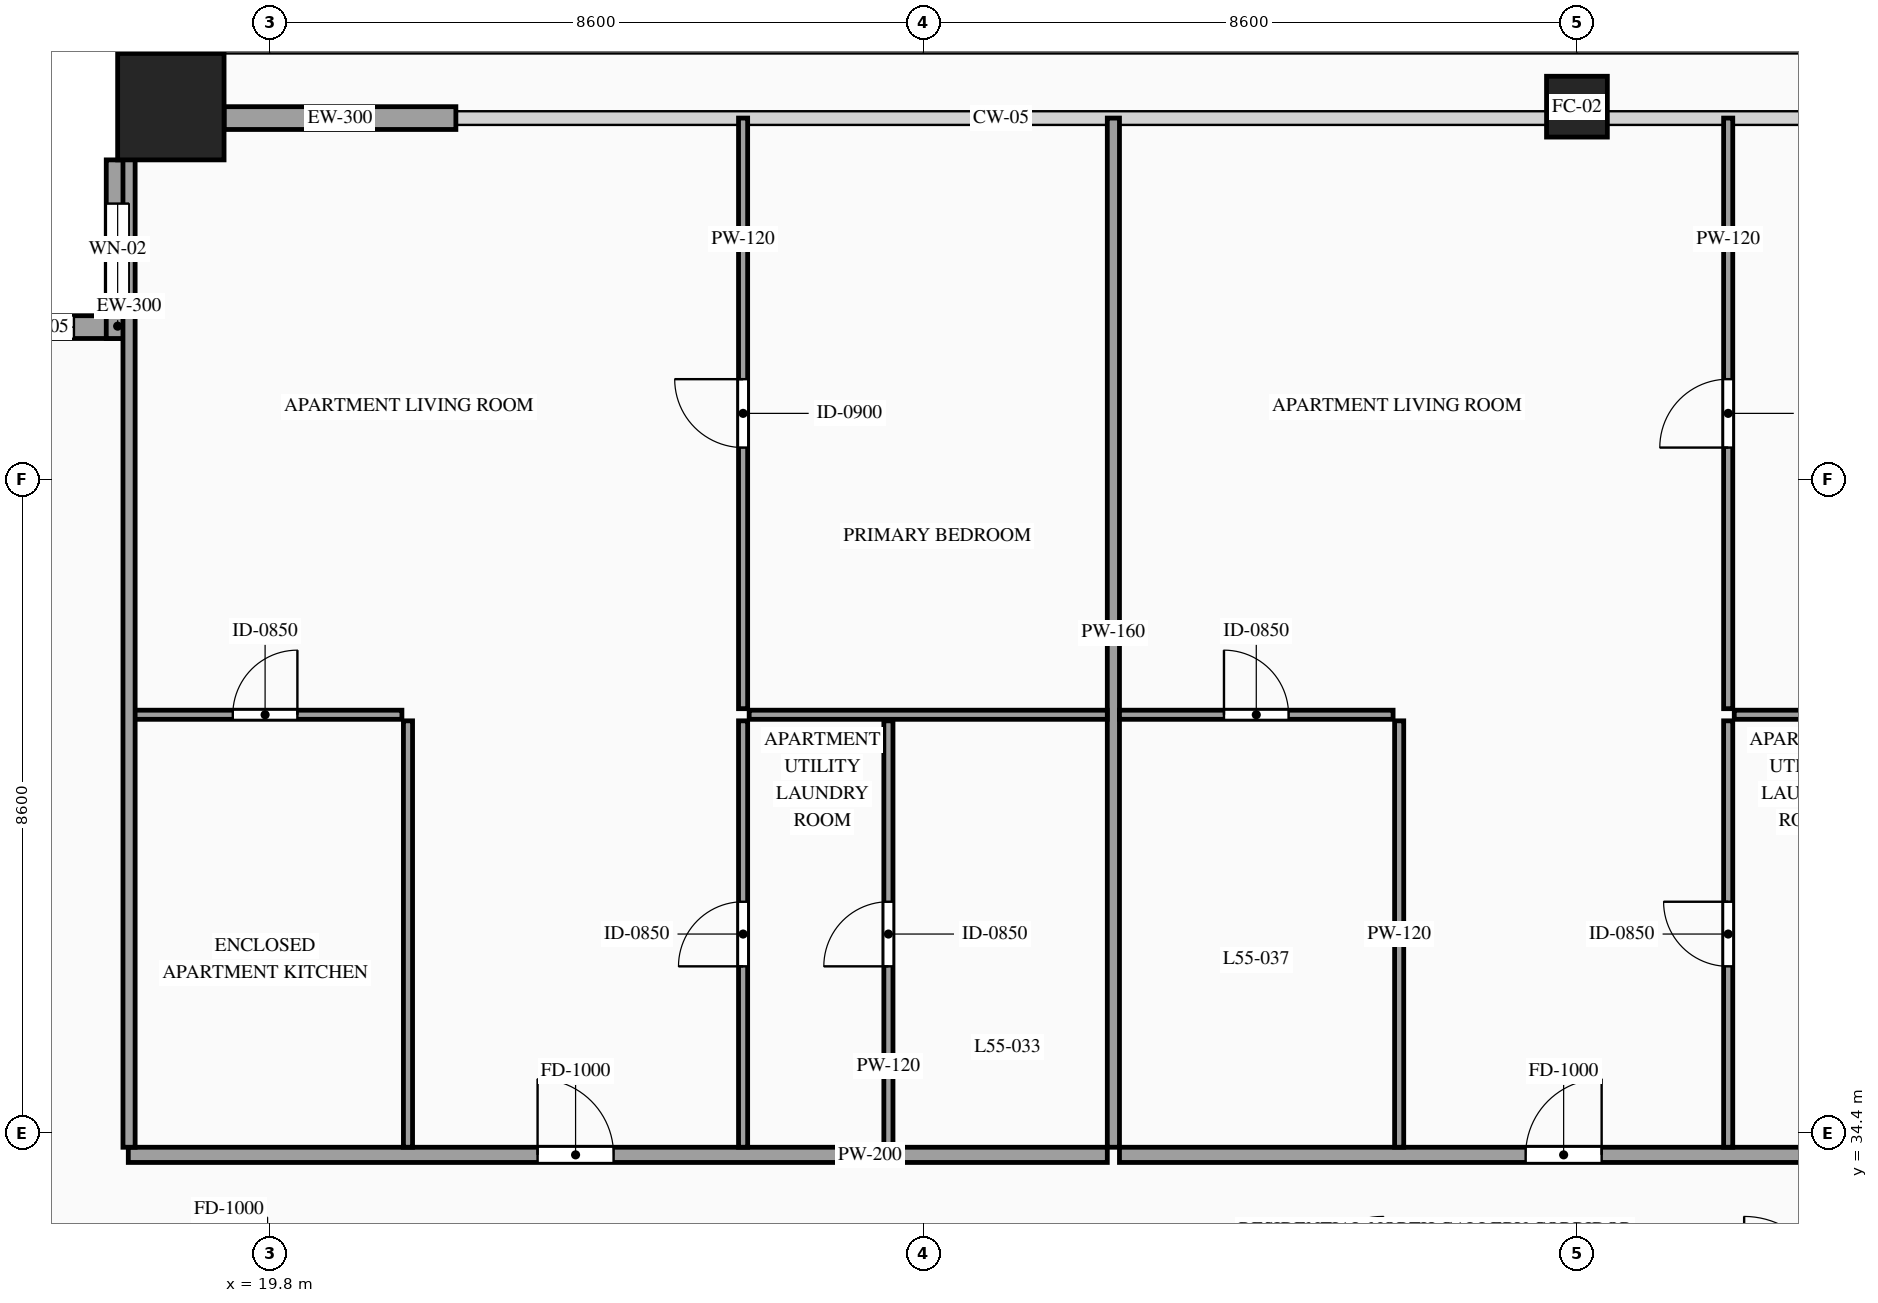
"""IFC4 building model, lengths in metres.
Left out: names, types, materials, properties, quantities, classifications, styles, units other than length and angle.
Written with IfcOpenShell. Run it as: python <this file> out.ifc"""

import sys

from ifc_helpers import new_model, si_unit, direction, frame, frame_2d, origin, origin_2d, place, context, subcontext, project, spatial, rectangle, hollow_rectangle, extrude, source, transform, mapped, element, fill, save


model = new_model("IFC4")
c1 = context("Model", 3, precision=1e-05, world=origin(), true_north=direction((0.0, 1.0)))
c2 = subcontext(c1, "Body", "Model", "MODEL_VIEW")
j1 = project(units=[si_unit("LENGTHUNIT", "METRE"), si_unit("PLANEANGLEUNIT", "RADIAN")], contexts=[c1])
p1 = place(None, origin())
s1 = spatial("IfcSite", under=j1, at=p1, CompositionType="ELEMENT")
p2 = place(p1, origin())
s2 = spatial("IfcBuilding", under=s1, at=p2, CompositionType="ELEMENT")
p3 = place(p2, frame((0.0, 0.0, 209.0)))
s3 = spatial("IfcBuildingStorey", under=s2, at=p3, CompositionType="ELEMENT", Elevation=209.0)
m1 = source(origin(), c2, "Body", "SweptSolid", [
    extrude(hollow_rectangle(XDim=1.4, YDim=1.4, WallThickness=0.06, at=origin_2d()), origin(), (0.0, 0.0, 1.0), 3.5),
])
p4 = place(p3, frame((18.5, 47.9, 0.0), z_axis=(0.0, 0.0, 1.0), x_axis=(1.0, 0.0, 0.0)))
e1 = element("IfcColumn", 1, at=p4, inside=s3, PredefinedType="COLUMN", context=c2, shape_type="MappedRepresentation", body=[
    mapped(m1, transform((0.0, 0.0, 0.0), scale=1.0)),
])
m2 = source(origin(), c2, "Body", "SweptSolid", [
    extrude(hollow_rectangle(XDim=0.8, YDim=0.8, WallThickness=0.036, at=origin_2d()), origin(), (0.0, 0.0, 1.0), 3.5),
])
p5 = place(p3, frame((37.0, 47.9, 0.0), z_axis=(0.0, 0.0, 1.0), x_axis=(1.0, 0.0, 0.0)))
e2 = element("IfcColumn", 2, at=p5, inside=s3, PredefinedType="COLUMN", context=c2, shape_type="MappedRepresentation", body=[
    mapped(m2, transform((0.0, 0.0, 0.0), scale=1.0)),
])
p6 = place(p3, frame((17.95, 45.0, 0.0), z_axis=(0.0, 0.0, 1.0), x_axis=(-1.0, 0.0, 0.0)))
e3 = element("IfcWall", 3, at=p6, inside=s3, PredefinedType="SOLIDWALL", context=c2, shape_type="SweptSolid", body=[
    extrude(rectangle(XDim=2.35, YDim=0.3, at=frame_2d((1.175, 0.0))), origin(), (0.0, 0.0, 1.0), 3.28),
])
p7 = place(p6, frame((0.725, 0.0, 0.85)))
e4 = element("IfcOpeningElement", 4, at=p7, cuts=e3, PredefinedType="OPENING", context=c2, shape_type="SweptSolid", body=[
    extrude(rectangle(XDim=0.9, YDim=1.5, at=frame_2d((0.45, 0.75))), frame((0.0, 0.165, 0.0), z_axis=(0.0, -1.0, 0.0), x_axis=(1.0, 0.0, 0.0)), (0.0, 0.0, 1.0), 0.33),
])
p8 = place(p3, frame((17.8, 47.2, 0.0), z_axis=(0.0, 0.0, 1.0), x_axis=(0.0, -1.0, 0.0)))
e5 = element("IfcWall", 5, at=p8, inside=s3, PredefinedType="SOLIDWALL", context=c2, shape_type="SweptSolid", body=[
    extrude(rectangle(XDim=2.35, YDim=0.3, at=frame_2d((1.175, 0.0))), origin(), (0.0, 0.0, 1.0), 3.28),
])
p9 = place(p8, frame((0.575, 0.0, 0.85)))
e6 = element("IfcOpeningElement", 6, at=p9, cuts=e5, PredefinedType="OPENING", context=c2, shape_type="SweptSolid", body=[
    extrude(rectangle(XDim=1.2, YDim=2.1, at=frame_2d((0.6, 1.05))), frame((0.0, 0.165, 0.0), z_axis=(0.0, -1.0, 0.0), x_axis=(1.0, 0.0, 0.0)), (0.0, 0.0, 1.0), 0.33),
])
m3 = source(origin(), c2, "Body", "SweptSolid", [
    extrude(rectangle(XDim=3.05, YDim=0.3, at=frame_2d((1.525, 0.0))), origin(), (0.0, 0.0, 1.0), 2.835),
])
p10 = place(p3, frame((19.2, 47.75, 0.0), z_axis=(0.0, 0.0, 1.0), x_axis=(1.0, 0.0, 0.0)))
e7 = element("IfcWall", 7, at=p10, inside=s3, PredefinedType="SOLIDWALL", context=c2, shape_type="MappedRepresentation", body=[
    mapped(m3, transform((0.0, 0.0, 0.0), scale=1.0)),
])
p11 = place(p3, frame((17.94, 34.11, 0.0), z_axis=(0.0, 0.0, 1.0), x_axis=(1.0, 0.0, 0.0)))
e8 = element("IfcWall", 8, at=p11, inside=s3, PredefinedType="PARTITIONING", context=c2, shape_type="SweptSolid", body=[
    extrude(rectangle(XDim=12.881, YDim=0.2, at=frame_2d((6.44, 0.0))), origin(), (0.0, 0.0, 1.0), 3.28),
])
p12 = place(p11, frame((5.385, 0.0, 0.0)))
e9 = element("IfcOpeningElement", 9, at=p12, cuts=e8, PredefinedType="OPENING", context=c2, shape_type="SweptSolid", body=[
    extrude(rectangle(XDim=1.0, YDim=2.2, at=frame_2d((0.5, 1.1))), frame((0.0, 0.115, 0.0), z_axis=(0.0, -1.0, 0.0), x_axis=(1.0, 0.0, 0.0)), (0.0, 0.0, 1.0), 0.23),
])
m4 = source(origin(), c2, "Body", "SweptSolid", [
    extrude(rectangle(XDim=13.54, YDim=0.16, at=frame_2d((6.77, 0.0))), origin(), (0.0, 0.0, 1.0), 3.28),
])
p13 = place(p3, frame((30.901, 34.21, 0.0), z_axis=(0.0, 0.0, 1.0), x_axis=(0.0, 1.0, 0.0)))
e10 = element("IfcWall", 10, at=p13, inside=s3, PredefinedType="PARTITIONING", context=c2, shape_type="MappedRepresentation", body=[
    mapped(m4, transform((0.0, 0.0, 0.0), scale=1.0)),
])
p14 = place(p3, frame((17.94, 39.9, 0.0), z_axis=(0.0, 0.0, 1.0), x_axis=(1.0, 0.0, 0.0)))
e11 = element("IfcWall", 11, at=p14, inside=s3, PredefinedType="PARTITIONING", context=c2, shape_type="SweptSolid", body=[
    extrude(rectangle(XDim=3.6, YDim=0.12, at=frame_2d((1.8, 0.0))), origin(), (0.0, 0.0, 1.0), 3.28),
])
p15 = place(p14, frame((1.375, 0.0, 0.0)))
e12 = element("IfcOpeningElement", 12, at=p15, cuts=e11, PredefinedType="OPENING", context=c2, shape_type="SweptSolid", body=[
    extrude(rectangle(XDim=0.85, YDim=2.1, at=frame_2d((0.425, 1.05))), frame((0.0, 0.075, 0.0), z_axis=(0.0, -1.0, 0.0), x_axis=(1.0, 0.0, 0.0)), (0.0, 0.0, 1.0), 0.15),
])
m5 = source(origin(), c2, "Body", "SweptSolid", [
    extrude(rectangle(XDim=5.61, YDim=0.12, at=frame_2d((2.805, 0.0))), origin(), (0.0, 0.0, 1.0), 3.28),
])
p16 = place(p3, frame((21.62, 34.21, 0.0), z_axis=(0.0, 0.0, 1.0), x_axis=(0.0, 1.0, 0.0)))
e13 = element("IfcWall", 13, at=p16, inside=s3, PredefinedType="PARTITIONING", context=c2, shape_type="MappedRepresentation", body=[
    mapped(m5, transform((0.0, 0.0, 0.0), scale=1.0)),
])
p17 = place(p3, frame((27.941, 34.21, 0.0), z_axis=(0.0, 0.0, 1.0), x_axis=(0.0, 1.0, 0.0)))
e14 = element("IfcWall", 14, at=p17, inside=s3, PredefinedType="PARTITIONING", context=c2, shape_type="SweptSolid", body=[
    extrude(rectangle(XDim=5.61, YDim=0.12, at=frame_2d((2.805, 0.0))), origin(), (0.0, 0.0, 1.0), 3.28),
])
p18 = place(p17, frame((2.38, 0.0, 0.0)))
e15 = element("IfcOpeningElement", 15, at=p18, cuts=e14, PredefinedType="OPENING", context=c2, shape_type="SweptSolid", body=[
    extrude(rectangle(XDim=0.85, YDim=2.1, at=frame_2d((0.425, 1.05))), frame((0.0, 0.075, 0.0), z_axis=(0.0, -1.0, 0.0), x_axis=(1.0, 0.0, 0.0)), (0.0, 0.0, 1.0), 0.15),
])
m6 = source(origin(), c2, "Body", "SweptSolid", [
    extrude(rectangle(XDim=4.712, YDim=0.12, at=frame_2d((2.356, 0.0))), origin(), (0.0, 0.0, 1.0), 2.875),
])
p19 = place(p3, frame((26.109, 39.9, 0.0), z_axis=(0.0, 0.0, 1.0), x_axis=(1.0, 0.0, 0.0)))
e16 = element("IfcWall", 16, at=p19, inside=s3, PredefinedType="PARTITIONING", context=c2, shape_type="MappedRepresentation", body=[
    mapped(m6, transform((0.0, 0.0, 0.0), scale=1.0)),
])
p20 = place(p3, frame((26.029, 39.98, 0.0), z_axis=(0.0, 0.0, 1.0), x_axis=(0.0, 1.0, 0.0)))
e17 = element("IfcWall", 17, at=p20, inside=s3, PredefinedType="PARTITIONING", context=c2, shape_type="SweptSolid", body=[
    extrude(rectangle(XDim=7.77, YDim=0.12, at=frame_2d((3.885, 0.0))), origin(), (0.0, 0.0, 1.0), 3.28),
])
p21 = place(p20, frame((3.435, 0.0, 0.0)))
e18 = element("IfcOpeningElement", 18, at=p21, cuts=e17, PredefinedType="OPENING", context=c2, shape_type="SweptSolid", body=[
    extrude(rectangle(XDim=0.9, YDim=2.15, at=frame_2d((0.45, 1.075))), frame((0.0, 0.075, 0.0), z_axis=(0.0, -1.0, 0.0), x_axis=(1.0, 0.0, 0.0)), (0.0, 0.0, 1.0), 0.15),
])
p22 = place(p3, frame((26.029, 34.21, 0.0), z_axis=(0.0, 0.0, 1.0), x_axis=(0.0, 1.0, 0.0)))
e19 = element("IfcWall", 19, at=p22, inside=s3, PredefinedType="PARTITIONING", context=c2, shape_type="SweptSolid", body=[
    extrude(rectangle(XDim=5.61, YDim=0.12, at=frame_2d((2.805, 0.0))), origin(), (0.0, 0.0, 1.0), 3.28),
])
p23 = place(p22, frame((2.38, 0.0, 0.0)))
e20 = element("IfcOpeningElement", 20, at=p23, cuts=e19, PredefinedType="OPENING", context=c2, shape_type="SweptSolid", body=[
    extrude(rectangle(XDim=0.85, YDim=2.1, at=frame_2d((0.425, 1.05))), frame((0.0, 0.075, 0.0), z_axis=(0.0, -1.0, 0.0), x_axis=(1.0, 0.0, 0.0)), (0.0, 0.0, 1.0), 0.15),
])
p24 = place(p3, frame((30.981, 34.11, 0.0), z_axis=(0.0, 0.0, 1.0), x_axis=(1.0, 0.0, 0.0)))
e21 = element("IfcWall", 21, at=p24, inside=s3, PredefinedType="PARTITIONING", context=c2, shape_type="SweptSolid", body=[
    extrude(rectangle(XDim=12.801, YDim=0.2, at=frame_2d((6.4, 0.0))), origin(), (0.0, 0.0, 1.0), 3.28),
])
p25 = place(p24, frame((5.344, 0.0, 0.0)))
e22 = element("IfcOpeningElement", 22, at=p25, cuts=e21, PredefinedType="OPENING", context=c2, shape_type="SweptSolid", body=[
    extrude(rectangle(XDim=1.0, YDim=2.2, at=frame_2d((0.5, 1.1))), frame((0.0, 0.115, 0.0), z_axis=(0.0, -1.0, 0.0), x_axis=(1.0, 0.0, 0.0)), (0.0, 0.0, 1.0), 0.23),
])
p26 = place(p3, frame((30.981, 39.9, 0.0), z_axis=(0.0, 0.0, 1.0), x_axis=(1.0, 0.0, 0.0)))
e23 = element("IfcWall", 23, at=p26, inside=s3, PredefinedType="PARTITIONING", context=c2, shape_type="SweptSolid", body=[
    extrude(rectangle(XDim=3.6, YDim=0.12, at=frame_2d((1.8, 0.0))), origin(), (0.0, 0.0, 1.0), 2.875),
])
p27 = place(p26, frame((1.375, 0.0, 0.0)))
e24 = element("IfcOpeningElement", 24, at=p27, cuts=e23, PredefinedType="OPENING", context=c2, shape_type="SweptSolid", body=[
    extrude(rectangle(XDim=0.85, YDim=2.1, at=frame_2d((0.425, 1.05))), frame((0.0, 0.075, 0.0), z_axis=(0.0, -1.0, 0.0), x_axis=(1.0, 0.0, 0.0)), (0.0, 0.0, 1.0), 0.15),
])
p28 = place(p3, frame((34.661, 34.21, 0.0), z_axis=(0.0, 0.0, 1.0), x_axis=(0.0, 1.0, 0.0)))
e25 = element("IfcWall", 25, at=p28, inside=s3, PredefinedType="PARTITIONING", context=c2, shape_type="MappedRepresentation", body=[
    mapped(m5, transform((0.0, 0.0, 0.0), scale=1.0)),
])
m7 = source(origin(), c2, "Body", "SweptSolid", [
    extrude(rectangle(XDim=4.712, YDim=0.12, at=frame_2d((2.356, 0.0))), origin(), (0.0, 0.0, 1.0), 2.875),
])
p29 = place(p3, frame((39.07, 39.9, 0.0), z_axis=(0.0, 0.0, 1.0), x_axis=(1.0, 0.0, 0.0)))
e26 = element("IfcWall", 26, at=p29, inside=s3, PredefinedType="PARTITIONING", context=c2, shape_type="MappedRepresentation", body=[
    mapped(m7, transform((0.0, 0.0, 0.0), scale=1.0)),
])
p30 = place(p3, frame((38.99, 39.98, 0.0), z_axis=(0.0, 0.0, 1.0), x_axis=(0.0, 1.0, 0.0)))
e27 = element("IfcWall", 27, at=p30, inside=s3, PredefinedType="PARTITIONING", context=c2, shape_type="SweptSolid", body=[
    extrude(rectangle(XDim=7.77, YDim=0.12, at=frame_2d((3.885, 0.0))), origin(), (0.0, 0.0, 1.0), 3.28),
])
p31 = place(p30, frame((3.435, 0.0, 0.0)))
e28 = element("IfcOpeningElement", 28, at=p31, cuts=e27, PredefinedType="OPENING", context=c2, shape_type="SweptSolid", body=[
    extrude(rectangle(XDim=0.9, YDim=2.15, at=frame_2d((0.45, 1.075))), frame((0.0, 0.075, 0.0), z_axis=(0.0, -1.0, 0.0), x_axis=(1.0, 0.0, 0.0)), (0.0, 0.0, 1.0), 0.15),
])
p32 = place(p3, frame((38.99, 34.21, 0.0), z_axis=(0.0, 0.0, 1.0), x_axis=(0.0, 1.0, 0.0)))
e29 = element("IfcWall", 29, at=p32, inside=s3, PredefinedType="PARTITIONING", context=c2, shape_type="SweptSolid", body=[
    extrude(rectangle(XDim=5.61, YDim=0.12, at=frame_2d((2.805, 0.0))), origin(), (0.0, 0.0, 1.0), 3.28),
])
p33 = place(p32, frame((2.38, 0.0, 0.0)))
e30 = element("IfcOpeningElement", 30, at=p33, cuts=e29, PredefinedType="OPENING", context=c2, shape_type="SweptSolid", body=[
    extrude(rectangle(XDim=0.85, YDim=2.1, at=frame_2d((0.425, 1.05))), frame((0.0, 0.075, 0.0), z_axis=(0.0, -1.0, 0.0), x_axis=(1.0, 0.0, 0.0)), (0.0, 0.0, 1.0), 0.15),
])
m8 = source(origin(), c2, "Body", "SweptSolid", [
    extrude(rectangle(XDim=13.39, YDim=0.16, at=frame_2d((6.695, 0.0))), origin(), (0.0, 0.0, 1.0), 3.28),
])
p34 = place(p3, frame((17.95, 34.21, 0.0), z_axis=(0.0, 0.0, 1.0), x_axis=(0.0, 1.0, 0.0)))
e31 = element("IfcWall", 31, at=p34, inside=s3, PredefinedType="PARTITIONING", context=c2, shape_type="MappedRepresentation", body=[
    mapped(m8, transform((0.0, 0.0, 0.0), scale=1.0)),
])
m9 = source(origin(), c2, "Body", "SweptSolid", [
    extrude(rectangle(XDim=0.9, YDim=1.5, at=frame_2d((0.45, 0.75))), frame((0.0, 0.03, 0.0), z_axis=(0.0, -1.0, 0.0), x_axis=(1.0, 0.0, 0.0)), (0.0, 0.0, 1.0), 0.06),
])
p35 = place(p7, origin())
e32 = element("IfcWindow", 32, at=p35, inside=s3, PartitioningType="SINGLE_PANEL", PredefinedType="WINDOW", context=c2, shape_type="MappedRepresentation", body=[
    mapped(m9, transform((0.0, 0.0, 0.0), scale=1.0)),
])
fill(e4, e32)
m10 = source(origin(), c2, "Body", "SweptSolid", [
    extrude(rectangle(XDim=1.2, YDim=2.1, at=frame_2d((0.6, 1.05))), frame((0.0, 0.03, 0.0), z_axis=(0.0, -1.0, 0.0), x_axis=(1.0, 0.0, 0.0)), (0.0, 0.0, 1.0), 0.06),
])
p36 = place(p9, origin())
e33 = element("IfcWindow", 33, at=p36, inside=s3, PartitioningType="SINGLE_PANEL", PredefinedType="WINDOW", context=c2, shape_type="MappedRepresentation", body=[
    mapped(m10, transform((0.0, 0.0, 0.0), scale=1.0)),
])
fill(e6, e33)
m11 = source(origin(), c2, "Body", "SweptSolid", [
    extrude(rectangle(XDim=1.0, YDim=2.2, at=frame_2d((0.5, 1.1))), frame((0.0, 0.025, 0.0), z_axis=(0.0, -1.0, 0.0), x_axis=(1.0, 0.0, 0.0)), (0.0, 0.0, 1.0), 0.05),
])
p37 = place(p12, origin())
e34 = element("IfcDoor", 34, at=p37, inside=s3, OperationType="SINGLE_SWING_LEFT", PredefinedType="DOOR", context=c2, shape_type="MappedRepresentation", body=[
    mapped(m11, transform((0.0, 0.0, 0.0), scale=1.0)),
])
fill(e9, e34)
m12 = source(origin(), c2, "Body", "SweptSolid", [
    extrude(rectangle(XDim=0.85, YDim=2.1, at=frame_2d((0.425, 1.05))), frame((0.0, 0.025, 0.0), z_axis=(0.0, -1.0, 0.0), x_axis=(1.0, 0.0, 0.0)), (0.0, 0.0, 1.0), 0.05),
])
p38 = place(p15, origin())
e35 = element("IfcDoor", 35, at=p38, inside=s3, OperationType="SINGLE_SWING_RIGHT", PredefinedType="DOOR", context=c2, shape_type="MappedRepresentation", body=[
    mapped(m12, transform((0.0, 0.0, 0.0), scale=1.0)),
])
fill(e12, e35)
p39 = place(p18, origin())
e36 = element("IfcDoor", 36, at=p39, inside=s3, OperationType="SINGLE_SWING_LEFT", PredefinedType="DOOR", context=c2, shape_type="MappedRepresentation", body=[
    mapped(m12, transform((0.0, 0.0, 0.0), scale=1.0)),
])
fill(e15, e36)
m13 = source(origin(), c2, "Body", "SweptSolid", [
    extrude(rectangle(XDim=0.9, YDim=2.15, at=frame_2d((0.45, 1.075))), frame((0.0, 0.025, 0.0), z_axis=(0.0, -1.0, 0.0), x_axis=(1.0, 0.0, 0.0)), (0.0, 0.0, 1.0), 0.05),
])
p40 = place(p21, origin())
e37 = element("IfcDoor", 37, at=p40, inside=s3, OperationType="SINGLE_SWING_RIGHT", PredefinedType="DOOR", context=c2, shape_type="MappedRepresentation", body=[
    mapped(m13, transform((0.0, 0.0, 0.0), scale=1.0)),
])
fill(e18, e37)
p41 = place(p23, origin())
e38 = element("IfcDoor", 38, at=p41, inside=s3, OperationType="SINGLE_SWING_LEFT", PredefinedType="DOOR", context=c2, shape_type="MappedRepresentation", body=[
    mapped(m12, transform((0.0, 0.0, 0.0), scale=1.0)),
])
fill(e20, e38)
p42 = place(p25, origin())
e39 = element("IfcDoor", 39, at=p42, inside=s3, OperationType="SINGLE_SWING_RIGHT", PredefinedType="DOOR", context=c2, shape_type="MappedRepresentation", body=[
    mapped(m11, transform((0.0, 0.0, 0.0), scale=1.0)),
])
fill(e22, e39)
p43 = place(p27, origin())
e40 = element("IfcDoor", 40, at=p43, inside=s3, OperationType="SINGLE_SWING_LEFT", PredefinedType="DOOR", context=c2, shape_type="MappedRepresentation", body=[
    mapped(m12, transform((0.0, 0.0, 0.0), scale=1.0)),
])
fill(e24, e40)
p44 = place(p31, origin())
e41 = element("IfcDoor", 41, at=p44, inside=s3, OperationType="SINGLE_SWING_LEFT", PredefinedType="DOOR", context=c2, shape_type="MappedRepresentation", body=[
    mapped(m13, transform((0.0, 0.0, 0.0), scale=1.0)),
])
fill(e28, e41)
p45 = place(p33, origin())
e42 = element("IfcDoor", 42, at=p45, inside=s3, OperationType="SINGLE_SWING_RIGHT", PredefinedType="DOOR", context=c2, shape_type="MappedRepresentation", body=[
    mapped(m12, transform((0.0, 0.0, 0.0), scale=1.0)),
])
fill(e30, e42)
save(model, sys.argv[1])
